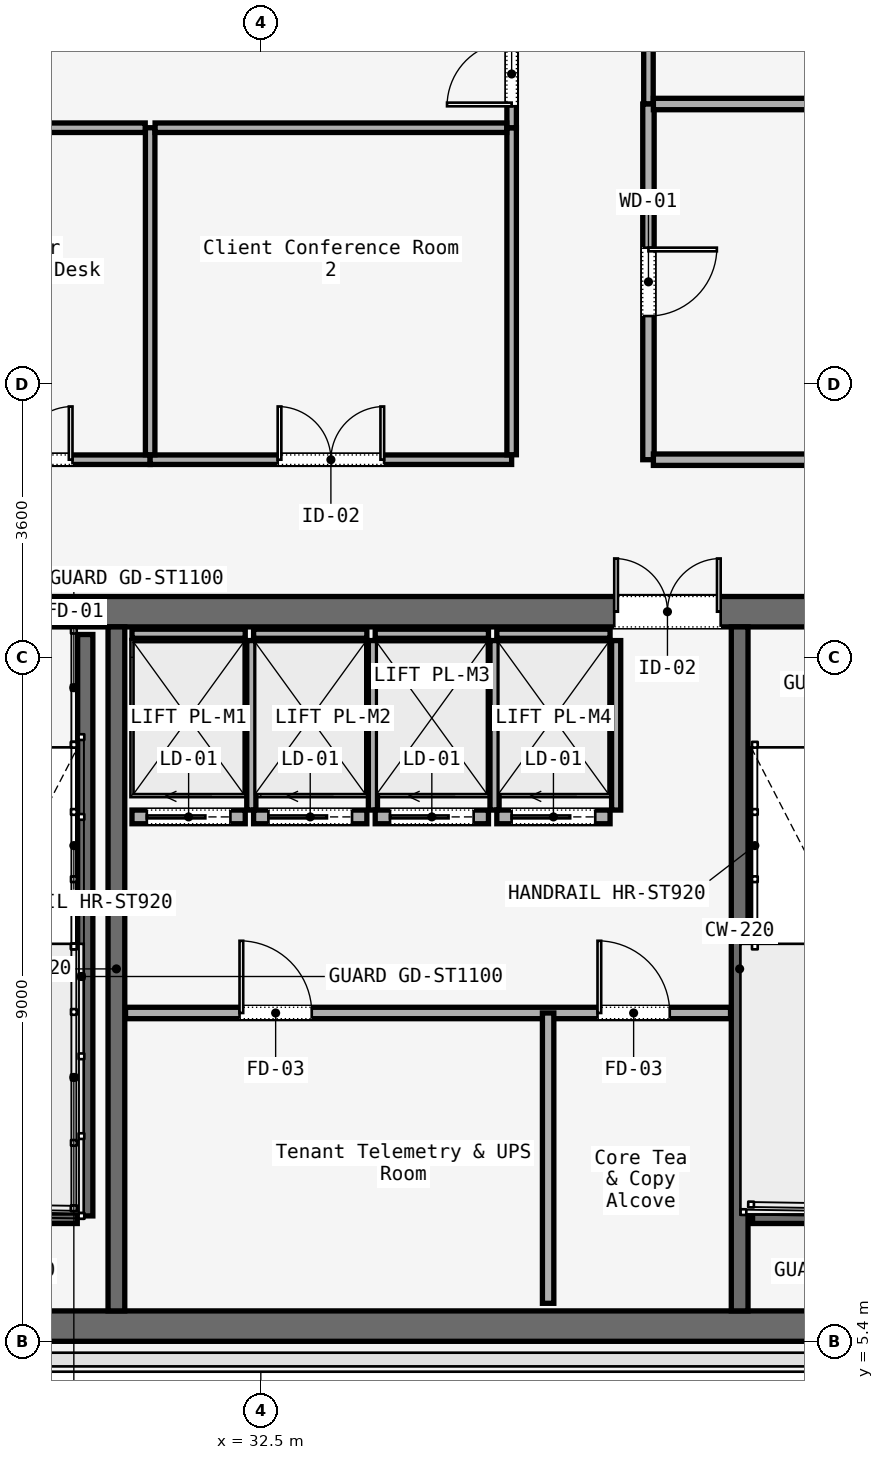
"""IFC4 building model, lengths in metres.
Left out: names, types, materials, properties, quantities, classifications, styles, units other than length and angle.
Written with IfcOpenShell. Run it as: python <this file> out.ifc"""

import sys

from ifc_helpers import new_model, si_unit, direction, frame, frame_2d, origin, place, context, subcontext, project, spatial, rectangle, extrude, element, fill, save


model = new_model("IFC4")
c1 = context("Model", 3, precision=1e-05, world=origin(), true_north=direction((0.0, 1.0)))
c2 = subcontext(c1, "Body", "Model", "MODEL_VIEW")
j1 = project(units=[si_unit("LENGTHUNIT", "METRE"), si_unit("PLANEANGLEUNIT", "RADIAN")], contexts=[c1])
p1 = place(None, origin())
s1 = spatial("IfcSite", under=j1, at=p1, CompositionType="ELEMENT")
p2 = place(p1, origin())
s2 = spatial("IfcBuilding", under=s1, at=p2, CompositionType="ELEMENT")
p3 = place(p2, frame((0.0, 0.0, 172.6)))
s3 = spatial("IfcBuildingStorey", under=s2, at=p3, CompositionType="ELEMENT", Elevation=172.6)
p4 = place(p3, frame((26.45, 15.0, 0.0), z_axis=(0.0, 0.0, 1.0), x_axis=(1.0, 0.0, 0.0)))
e1 = element("IfcWall", 1, at=p4, inside=s3, PredefinedType="SOLIDWALL", context=c2, shape_type="SweptSolid", body=[
    extrude(rectangle(XDim=31.1, YDim=0.4, at=frame_2d((15.55, 0.0))), origin(), (0.0, 0.0, 1.0), 3.58),
])
p5 = place(p4, frame((1.65, 0.0, 0.0)))
e2 = element("IfcOpeningElement", 2, at=p5, cuts=e1, PredefinedType="OPENING", context=c2, shape_type="SweptSolid", body=[
    extrude(rectangle(XDim=1.1, YDim=2.2, at=frame_2d((0.55, 1.1))), frame((0.0, 0.2, 0.0), z_axis=(0.0, -1.0, 0.0), x_axis=(1.0, 0.0, 0.0)), (0.0, 0.0, 1.0), 0.4),
])
p6 = place(p4, frame((13.65, 0.0, 0.0)))
e3 = element("IfcOpeningElement", 3, at=p6, cuts=e1, PredefinedType="OPENING", context=c2, shape_type="SweptSolid", body=[
    extrude(rectangle(XDim=1.1, YDim=2.2, at=frame_2d((0.55, 1.1))), frame((0.0, 0.2, 0.0), z_axis=(0.0, -1.0, 0.0), x_axis=(1.0, 0.0, 0.0)), (0.0, 0.0, 1.0), 0.4),
])
p7 = place(p4, frame((25.55, 0.0, 0.0)))
e4 = element("IfcOpeningElement", 4, at=p7, cuts=e1, PredefinedType="OPENING", context=c2, shape_type="SweptSolid", body=[
    extrude(rectangle(XDim=1.1, YDim=2.2, at=frame_2d((0.55, 1.1))), frame((0.0, 0.2, 0.0), z_axis=(0.0, -1.0, 0.0), x_axis=(1.0, 0.0, 0.0)), (0.0, 0.0, 1.0), 0.4),
])
p8 = place(p4, frame((10.7, 0.0, 0.0)))
e5 = element("IfcOpeningElement", 5, at=p8, cuts=e1, PredefinedType="OPENING", context=c2, shape_type="SweptSolid", body=[
    extrude(rectangle(XDim=1.4, YDim=2.2, at=frame_2d((0.7, 1.1))), frame((0.0, 0.2, 0.0), z_axis=(0.0, -1.0, 0.0), x_axis=(1.0, 0.0, 0.0)), (0.0, 0.0, 1.0), 0.4),
])
p9 = place(p4, frame((19.35, 0.0, 0.0)))
e6 = element("IfcOpeningElement", 6, at=p9, cuts=e1, PredefinedType="OPENING", context=c2, shape_type="SweptSolid", body=[
    extrude(rectangle(XDim=1.1, YDim=2.2, at=frame_2d((0.55, 1.1))), frame((0.0, 0.2, 0.0), z_axis=(0.0, -1.0, 0.0), x_axis=(1.0, 0.0, 0.0)), (0.0, 0.0, 1.0), 0.4),
])
p10 = place(p4, frame((21.4, 0.0, 0.0)))
e7 = element("IfcOpeningElement", 7, at=p10, cuts=e1, PredefinedType="OPENING", context=c2, shape_type="SweptSolid", body=[
    extrude(rectangle(XDim=0.9, YDim=2.1, at=frame_2d((0.45, 1.05))), frame((0.0, 0.2, 0.0), z_axis=(0.0, -1.0, 0.0), x_axis=(1.0, 0.0, 0.0)), (0.0, 0.0, 1.0), 0.4),
])
p11 = place(p4, frame((23.35, 0.0, 0.0)))
e8 = element("IfcOpeningElement", 8, at=p11, cuts=e1, PredefinedType="OPENING", context=c2, shape_type="SweptSolid", body=[
    extrude(rectangle(XDim=1.3, YDim=2.3, at=frame_2d((0.65, 1.15))), frame((0.0, 0.2, 0.0), z_axis=(0.0, -1.0, 0.0), x_axis=(1.0, 0.0, 0.0)), (0.0, 0.0, 1.0), 0.4),
])
p12 = place(p3, frame((26.45, 5.6, 0.0), z_axis=(0.0, 0.0, 1.0), x_axis=(1.0, 0.0, 0.0)))
e9 = element("IfcWall", 9, at=p12, inside=s3, PredefinedType="SOLIDWALL", context=c2, shape_type="SweptSolid", body=[
    extrude(rectangle(XDim=31.1, YDim=0.4, at=frame_2d((15.55, 0.0))), origin(), (0.0, 0.0, 1.0), 3.58),
])
for number, where, z_axis, x_axis in (
    (10, (30.6, 5.8, 0.0), (0.0, 0.0, 1.0), (0.0, 1.0, 0.0)),
    (11, (38.8, 5.8, 0.0), (0.0, 0.0, 1.0), (0.0, 1.0, 0.0)),
):
    element("IfcWall", number, at=place(p3, frame(where, z_axis=z_axis, x_axis=x_axis)), inside=s3, PredefinedType="SOLIDWALL", context=c2, shape_type="SweptSolid", body=[
        extrude(rectangle(XDim=9.0, YDim=0.22, at=frame_2d((4.5, 0.0))), origin(), (0.0, 0.0, 1.0), 3.58),
    ])
p13 = place(p3, frame((30.19, 14.7, 0.0), z_axis=(0.0, 0.0, 1.0), x_axis=(0.0, -1.0, 0.0)))
e12 = element("IfcWall", 12, at=p13, inside=s3, PredefinedType="SOLIDWALL", context=c2, shape_type="SweptSolid", body=[
    extrude(rectangle(XDim=7.65, YDim=0.2, at=frame_2d((3.825, 0.0))), origin(), (0.0, 0.0, 1.0), 3.8),
])
for number, where, z_axis, x_axis in (
    (13, (26.97, 7.05, 0.0), (0.0, 0.0, 1.0), (1.0, 0.0, 0.0)),
    (14, (38.97, 7.05, 0.0), (0.0, 0.0, 1.0), (1.0, 0.0, 0.0)),
):
    element("IfcWall", number, at=place(p3, frame(where, z_axis=z_axis, x_axis=x_axis)), inside=s3, PredefinedType="SOLIDWALL", context=c2, shape_type="SweptSolid", body=[
        extrude(rectangle(XDim=3.115, YDim=0.2, at=frame_2d((1.558, 0.0))), origin(), (0.0, 0.0, 1.0), 3.8),
    ])
p14 = place(p3, frame((30.72, 9.72, 0.0), z_axis=(0.0, 0.0, 1.0), x_axis=(1.0, 0.0, 0.0)))
e15 = element("IfcWall", 15, at=p14, inside=s3, PredefinedType="PARTITIONING", context=c2, shape_type="SweptSolid", body=[
    extrude(rectangle(XDim=7.96, YDim=0.15, at=frame_2d((3.98, 0.0))), origin(), (0.0, 0.0, 1.0), 3.01),
])
p15 = place(p14, frame((1.5, 0.0, 0.0)))
e16 = element("IfcOpeningElement", 16, at=p15, cuts=e15, PredefinedType="OPENING", context=c2, shape_type="SweptSolid", body=[
    extrude(rectangle(XDim=0.95, YDim=2.2, at=frame_2d((0.475, 1.1))), frame((0.0, 0.075, 0.0), z_axis=(0.0, -1.0, 0.0), x_axis=(1.0, 0.0, 0.0)), (0.0, 0.0, 1.0), 0.15),
])
p16 = place(p14, frame((6.21, 0.0, 0.0)))
e17 = element("IfcOpeningElement", 17, at=p16, cuts=e15, PredefinedType="OPENING", context=c2, shape_type="SweptSolid", body=[
    extrude(rectangle(XDim=0.95, YDim=2.2, at=frame_2d((0.475, 1.1))), frame((0.0, 0.075, 0.0), z_axis=(0.0, -1.0, 0.0), x_axis=(1.0, 0.0, 0.0)), (0.0, 0.0, 1.0), 0.15),
])
p17 = place(p3, frame((36.28, 5.9, 0.0), z_axis=(0.0, 0.0, 1.0), x_axis=(0.0, 1.0, 0.0)))
e18 = element("IfcWall", 18, at=p17, inside=s3, PredefinedType="PARTITIONING", context=c2, shape_type="SweptSolid", body=[
    extrude(rectangle(XDim=3.82, YDim=0.15, at=frame_2d((1.91, 0.0))), origin(), (0.0, 0.0, 1.0), 3.01),
])
p18 = place(p3, frame((30.805, 12.3, 0.0), z_axis=(0.0, 0.0, 1.0), x_axis=(1.0, 0.0, 0.0)))
e19 = element("IfcWall", 19, at=p18, inside=s3, PredefinedType="SOLIDWALL", context=c2, shape_type="SweptSolid", body=[
    extrude(rectangle(XDim=1.49, YDim=0.18, at=frame_2d((0.745, 0.0))), origin(), (0.0, 0.0, 1.0), 3.01),
])
p19 = place(p18, frame((0.195, 0.0, 0.0)))
e20 = element("IfcOpeningElement", 20, at=p19, cuts=e19, PredefinedType="OPENING", context=c2, shape_type="SweptSolid", body=[
    extrude(rectangle(XDim=1.1, YDim=2.2, at=frame_2d((0.55, 1.1))), frame((0.0, 0.09, 0.0), z_axis=(0.0, -1.0, 0.0), x_axis=(1.0, 0.0, 0.0)), (0.0, 0.0, 1.0), 0.18),
])
p20 = place(p3, frame((30.805, 14.71, 0.0), z_axis=(0.0, 0.0, 1.0), x_axis=(1.0, 0.0, 0.0)))
e21 = element("IfcWall", 21, at=p20, inside=s3, PredefinedType="SOLIDWALL", context=c2, shape_type="SweptSolid", body=[
    extrude(rectangle(XDim=1.49, YDim=0.12, at=frame_2d((0.745, 0.0))), origin(), (0.0, 0.0, 1.0), 3.01),
])
p21 = place(p3, frame((32.375, 12.39, 0.0), z_axis=(0.0, 0.0, 1.0), x_axis=(0.0, 1.0, 0.0)))
e22 = element("IfcWall", 22, at=p21, inside=s3, PredefinedType="SOLIDWALL", context=c2, shape_type="SweptSolid", body=[
    extrude(rectangle(XDim=2.23, YDim=0.12, at=frame_2d((1.115, 0.0))), origin(), (0.0, 0.0, 1.0), 3.01),
])
p22 = place(p3, frame((32.405, 12.3, 0.0), z_axis=(0.0, 0.0, 1.0), x_axis=(1.0, 0.0, 0.0)))
e23 = element("IfcWall", 23, at=p22, inside=s3, PredefinedType="SOLIDWALL", context=c2, shape_type="SweptSolid", body=[
    extrude(rectangle(XDim=1.49, YDim=0.18, at=frame_2d((0.745, 0.0))), origin(), (0.0, 0.0, 1.0), 3.01),
])
p23 = place(p22, frame((0.195, 0.0, 0.0)))
e24 = element("IfcOpeningElement", 24, at=p23, cuts=e23, PredefinedType="OPENING", context=c2, shape_type="SweptSolid", body=[
    extrude(rectangle(XDim=1.1, YDim=2.2, at=frame_2d((0.55, 1.1))), frame((0.0, 0.09, 0.0), z_axis=(0.0, -1.0, 0.0), x_axis=(1.0, 0.0, 0.0)), (0.0, 0.0, 1.0), 0.18),
])
p24 = place(p3, frame((32.405, 14.71, 0.0), z_axis=(0.0, 0.0, 1.0), x_axis=(1.0, 0.0, 0.0)))
e25 = element("IfcWall", 25, at=p24, inside=s3, PredefinedType="SOLIDWALL", context=c2, shape_type="SweptSolid", body=[
    extrude(rectangle(XDim=1.49, YDim=0.12, at=frame_2d((0.745, 0.0))), origin(), (0.0, 0.0, 1.0), 3.01),
])
p25 = place(p3, frame((33.975, 12.39, 0.0), z_axis=(0.0, 0.0, 1.0), x_axis=(0.0, 1.0, 0.0)))
e26 = element("IfcWall", 26, at=p25, inside=s3, PredefinedType="SOLIDWALL", context=c2, shape_type="SweptSolid", body=[
    extrude(rectangle(XDim=2.23, YDim=0.12, at=frame_2d((1.115, 0.0))), origin(), (0.0, 0.0, 1.0), 3.01),
])
p26 = place(p3, frame((34.005, 12.3, 0.0), z_axis=(0.0, 0.0, 1.0), x_axis=(1.0, 0.0, 0.0)))
e27 = element("IfcWall", 27, at=p26, inside=s3, PredefinedType="SOLIDWALL", context=c2, shape_type="SweptSolid", body=[
    extrude(rectangle(XDim=1.49, YDim=0.18, at=frame_2d((0.745, 0.0))), origin(), (0.0, 0.0, 1.0), 3.01),
])
p27 = place(p26, frame((0.195, 0.0, 0.0)))
e28 = element("IfcOpeningElement", 28, at=p27, cuts=e27, PredefinedType="OPENING", context=c2, shape_type="SweptSolid", body=[
    extrude(rectangle(XDim=1.1, YDim=2.2, at=frame_2d((0.55, 1.1))), frame((0.0, 0.09, 0.0), z_axis=(0.0, -1.0, 0.0), x_axis=(1.0, 0.0, 0.0)), (0.0, 0.0, 1.0), 0.18),
])
p28 = place(p3, frame((34.005, 14.71, 0.0), z_axis=(0.0, 0.0, 1.0), x_axis=(1.0, 0.0, 0.0)))
e29 = element("IfcWall", 29, at=p28, inside=s3, PredefinedType="SOLIDWALL", context=c2, shape_type="SweptSolid", body=[
    extrude(rectangle(XDim=1.49, YDim=0.12, at=frame_2d((0.745, 0.0))), origin(), (0.0, 0.0, 1.0), 3.01),
])
p29 = place(p3, frame((35.575, 12.39, 0.0), z_axis=(0.0, 0.0, 1.0), x_axis=(0.0, 1.0, 0.0)))
e30 = element("IfcWall", 30, at=p29, inside=s3, PredefinedType="SOLIDWALL", context=c2, shape_type="SweptSolid", body=[
    extrude(rectangle(XDim=2.23, YDim=0.12, at=frame_2d((1.115, 0.0))), origin(), (0.0, 0.0, 1.0), 3.01),
])
p30 = place(p3, frame((35.605, 12.3, 0.0), z_axis=(0.0, 0.0, 1.0), x_axis=(1.0, 0.0, 0.0)))
e31 = element("IfcWall", 31, at=p30, inside=s3, PredefinedType="SOLIDWALL", context=c2, shape_type="SweptSolid", body=[
    extrude(rectangle(XDim=1.49, YDim=0.18, at=frame_2d((0.745, 0.0))), origin(), (0.0, 0.0, 1.0), 3.01),
])
p31 = place(p30, frame((0.195, 0.0, 0.0)))
e32 = element("IfcOpeningElement", 32, at=p31, cuts=e31, PredefinedType="OPENING", context=c2, shape_type="SweptSolid", body=[
    extrude(rectangle(XDim=1.1, YDim=2.2, at=frame_2d((0.55, 1.1))), frame((0.0, 0.09, 0.0), z_axis=(0.0, -1.0, 0.0), x_axis=(1.0, 0.0, 0.0)), (0.0, 0.0, 1.0), 0.18),
])
p32 = place(p3, frame((35.605, 14.71, 0.0), z_axis=(0.0, 0.0, 1.0), x_axis=(1.0, 0.0, 0.0)))
e33 = element("IfcWall", 33, at=p32, inside=s3, PredefinedType="SOLIDWALL", context=c2, shape_type="SweptSolid", body=[
    extrude(rectangle(XDim=1.49, YDim=0.12, at=frame_2d((0.745, 0.0))), origin(), (0.0, 0.0, 1.0), 3.01),
])
p33 = place(p3, frame((37.175, 12.39, 0.0), z_axis=(0.0, 0.0, 1.0), x_axis=(0.0, 1.0, 0.0)))
e34 = element("IfcWall", 34, at=p33, inside=s3, PredefinedType="SOLIDWALL", context=c2, shape_type="SweptSolid", body=[
    extrude(rectangle(XDim=2.23, YDim=0.12, at=frame_2d((1.115, 0.0))), origin(), (0.0, 0.0, 1.0), 3.01),
])
p34 = place(p3, frame((27.6, 17.0, 0.0), z_axis=(0.0, 0.0, 1.0), x_axis=(1.0, 0.0, 0.0)))
e35 = element("IfcWall", 35, at=p34, inside=s3, PredefinedType="PARTITIONING", context=c2, shape_type="SweptSolid", body=[
    extrude(rectangle(XDim=3.444, YDim=0.125, at=frame_2d((1.722, 0.0))), origin(), (0.0, 0.0, 1.0), 3.01),
])
p35 = place(p34, frame((1.022, 0.0, 0.0)))
e36 = element("IfcOpeningElement", 36, at=p35, cuts=e35, PredefinedType="OPENING", context=c2, shape_type="SweptSolid", body=[
    extrude(rectangle(XDim=1.4, YDim=2.2, at=frame_2d((0.7, 1.1))), frame((0.0, 0.062, 0.0), z_axis=(0.0, -1.0, 0.0), x_axis=(1.0, 0.0, 0.0)), (0.0, 0.0, 1.0), 0.125),
])
p36 = place(p3, frame((31.044, 17.0, 0.0), z_axis=(0.0, 0.0, 1.0), x_axis=(1.0, 0.0, 0.0)))
e37 = element("IfcWall", 37, at=p36, inside=s3, PredefinedType="PARTITIONING", context=c2, shape_type="SweptSolid", body=[
    extrude(rectangle(XDim=4.756, YDim=0.125, at=frame_2d((2.378, 0.0))), origin(), (0.0, 0.0, 1.0), 3.01),
])
p37 = place(p36, frame((1.678, 0.0, 0.0)))
e38 = element("IfcOpeningElement", 38, at=p37, cuts=e37, PredefinedType="OPENING", context=c2, shape_type="SweptSolid", body=[
    extrude(rectangle(XDim=1.4, YDim=2.2, at=frame_2d((0.7, 1.1))), frame((0.0, 0.062, 0.0), z_axis=(0.0, -1.0, 0.0), x_axis=(1.0, 0.0, 0.0)), (0.0, 0.0, 1.0), 0.125),
])
p38 = place(p3, frame((35.8, 17.065, 0.0), z_axis=(0.0, 0.0, 1.0), x_axis=(0.0, 1.0, 0.0)))
e39 = element("IfcWall", 39, at=p38, inside=s3, PredefinedType="PARTITIONING", context=c2, shape_type="SweptSolid", body=[
    extrude(rectangle(XDim=4.303, YDim=0.125, at=frame_2d((2.151, 0.0))), origin(), (0.0, 0.0, 1.0), 3.01),
])
p39 = place(p3, frame((35.8, 21.368, 0.0), z_axis=(0.0, 0.0, 1.0), x_axis=(0.0, 1.0, 0.0)))
e40 = element("IfcWall", 40, at=p39, inside=s3, PredefinedType="PARTITIONING", context=c2, shape_type="SweptSolid", body=[
    extrude(rectangle(XDim=2.715, YDim=0.125, at=frame_2d((1.357, 0.0))), origin(), (0.0, 0.0, 1.0), 3.01),
])
p40 = place(p39, frame((0.282, 0.0, 0.0)))
e41 = element("IfcOpeningElement", 41, at=p40, cuts=e40, PredefinedType="OPENING", context=c2, shape_type="SweptSolid", body=[
    extrude(rectangle(XDim=0.85, YDim=2.15, at=frame_2d((0.425, 1.075))), frame((0.0, 0.062, 0.0), z_axis=(0.0, -1.0, 0.0), x_axis=(1.0, 0.0, 0.0)), (0.0, 0.0, 1.0), 0.125),
])
p41 = place(p3, frame((37.6, 27.4, 0.0), z_axis=(0.0, 0.0, 1.0), x_axis=(0.0, -1.0, 0.0)))
e42 = element("IfcWall", 42, at=p41, inside=s3, PredefinedType="PARTITIONING", context=c2, shape_type="SweptSolid", body=[
    extrude(rectangle(XDim=5.72, YDim=0.125, at=frame_2d((2.86, 0.0))), origin(), (0.0, 0.0, 1.0), 3.01),
])
p42 = place(p41, frame((2.385, 0.0, 0.0)))
e43 = element("IfcOpeningElement", 43, at=p42, cuts=e42, PredefinedType="OPENING", context=c2, shape_type="SweptSolid", body=[
    extrude(rectangle(XDim=0.95, YDim=2.2, at=frame_2d((0.475, 1.1))), frame((0.0, 0.062, 0.0), z_axis=(0.0, -1.0, 0.0), x_axis=(1.0, 0.0, 0.0)), (0.0, 0.0, 1.0), 0.125),
])
p43 = place(p3, frame((37.6, 21.68, 0.0), z_axis=(0.0, 0.0, 1.0), x_axis=(0.0, -1.0, 0.0)))
e44 = element("IfcWall", 44, at=p43, inside=s3, PredefinedType="PARTITIONING", context=c2, shape_type="SweptSolid", body=[
    extrude(rectangle(XDim=4.68, YDim=0.15, at=frame_2d((2.34, 0.0))), origin(), (0.0, 0.0, 1.0), 3.01),
])
p44 = place(p43, frame((1.89, 0.0, 0.0)))
e45 = element("IfcOpeningElement", 45, at=p44, cuts=e44, PredefinedType="OPENING", context=c2, shape_type="SweptSolid", body=[
    extrude(rectangle(XDim=0.9, YDim=2.15, at=frame_2d((0.45, 1.075))), frame((0.0, 0.075, 0.0), z_axis=(0.0, -1.0, 0.0), x_axis=(1.0, 0.0, 0.0)), (0.0, 0.0, 1.0), 0.15),
])
p45 = place(p3, frame((37.665, 17.0, 0.0), z_axis=(0.0, 0.0, 1.0), x_axis=(1.0, 0.0, 0.0)))
e46 = element("IfcWall", 46, at=p45, inside=s3, PredefinedType="PARTITIONING", context=c2, shape_type="SweptSolid", body=[
    extrude(rectangle(XDim=3.985, YDim=0.15, at=frame_2d((1.992, 0.0))), origin(), (0.0, 0.0, 1.0), 3.01),
])
p46 = place(p3, frame((31.044, 21.368, 0.0), z_axis=(0.0, 0.0, 1.0), x_axis=(0.0, -1.0, 0.0)))
e47 = element("IfcWall", 47, at=p46, inside=s3, PredefinedType="PARTITIONING", context=c2, shape_type="SweptSolid", body=[
    extrude(rectangle(XDim=4.303, YDim=0.125, at=frame_2d((2.151, 0.0))), origin(), (0.0, 0.0, 1.0), 3.01),
])
p47 = place(p3, frame((27.665, 21.368, 0.0), z_axis=(0.0, 0.0, 1.0), x_axis=(1.0, 0.0, 0.0)))
e48 = element("IfcWall", 48, at=p47, inside=s3, PredefinedType="PARTITIONING", context=c2, shape_type="SweptSolid", body=[
    extrude(rectangle(XDim=3.314, YDim=0.125, at=frame_2d((1.657, 0.0))), origin(), (0.0, 0.0, 1.0), 3.01),
])
p48 = place(p3, frame((31.109, 21.368, 0.0), z_axis=(0.0, 0.0, 1.0), x_axis=(1.0, 0.0, 0.0)))
e49 = element("IfcWall", 49, at=p48, inside=s3, PredefinedType="PARTITIONING", context=c2, shape_type="SweptSolid", body=[
    extrude(rectangle(XDim=4.626, YDim=0.125, at=frame_2d((2.313, 0.0))), origin(), (0.0, 0.0, 1.0), 3.01),
])
p49 = place(p3, frame((37.665, 21.68, 0.0), z_axis=(0.0, 0.0, 1.0), x_axis=(1.0, 0.0, 0.0)))
e50 = element("IfcWall", 50, at=p49, inside=s3, PredefinedType="PARTITIONING", context=c2, shape_type="SweptSolid", body=[
    extrude(rectangle(XDim=3.715, YDim=0.15, at=frame_2d((1.857, 0.0))), origin(), (0.0, 0.0, 1.0), 3.01),
])
p50 = place(p8, origin())
e51 = element("IfcDoor", 51, at=p50, inside=s3, OperationType="DOUBLE_DOOR_SINGLE_SWING", PredefinedType="DOOR", context=c2, shape_type="SweptSolid", body=[
    extrude(rectangle(XDim=1.4, YDim=2.2, at=frame_2d((0.7, 1.1))), frame((0.0, 0.025, 0.0), z_axis=(0.0, -1.0, 0.0), x_axis=(1.0, 0.0, 0.0)), (0.0, 0.0, 1.0), 0.05),
])
fill(e5, e51)
p51 = place(p15, origin())
e52 = element("IfcDoor", 52, at=p51, inside=s3, OperationType="SINGLE_SWING_LEFT", PredefinedType="DOOR", context=c2, shape_type="SweptSolid", body=[
    extrude(rectangle(XDim=0.95, YDim=2.2, at=frame_2d((0.475, 1.1))), frame((0.0, 0.025, 0.0), z_axis=(0.0, -1.0, 0.0), x_axis=(1.0, 0.0, 0.0)), (0.0, 0.0, 1.0), 0.05),
])
fill(e16, e52)
p52 = place(p16, origin())
e53 = element("IfcDoor", 53, at=p52, inside=s3, OperationType="SINGLE_SWING_RIGHT", PredefinedType="DOOR", context=c2, shape_type="SweptSolid", body=[
    extrude(rectangle(XDim=0.95, YDim=2.2, at=frame_2d((0.475, 1.1))), frame((0.0, 0.025, 0.0), z_axis=(0.0, -1.0, 0.0), x_axis=(1.0, 0.0, 0.0)), (0.0, 0.0, 1.0), 0.05),
])
fill(e17, e53)
p53 = place(p19, origin())
e54 = element("IfcDoor", 54, at=p53, inside=s3, OperationType="SLIDING_TO_LEFT", PredefinedType="DOOR", context=c2, shape_type="SweptSolid", body=[
    extrude(rectangle(XDim=1.1, YDim=2.2, at=frame_2d((0.55, 1.1))), frame((0.0, 0.025, 0.0), z_axis=(0.0, -1.0, 0.0), x_axis=(1.0, 0.0, 0.0)), (0.0, 0.0, 1.0), 0.05),
])
fill(e20, e54)
p54 = place(p23, origin())
e55 = element("IfcDoor", 55, at=p54, inside=s3, OperationType="SLIDING_TO_LEFT", PredefinedType="DOOR", context=c2, shape_type="SweptSolid", body=[
    extrude(rectangle(XDim=1.1, YDim=2.2, at=frame_2d((0.55, 1.1))), frame((0.0, 0.025, 0.0), z_axis=(0.0, -1.0, 0.0), x_axis=(1.0, 0.0, 0.0)), (0.0, 0.0, 1.0), 0.05),
])
fill(e24, e55)
p55 = place(p27, origin())
e56 = element("IfcDoor", 56, at=p55, inside=s3, OperationType="SLIDING_TO_LEFT", PredefinedType="DOOR", context=c2, shape_type="SweptSolid", body=[
    extrude(rectangle(XDim=1.1, YDim=2.2, at=frame_2d((0.55, 1.1))), frame((0.0, 0.025, 0.0), z_axis=(0.0, -1.0, 0.0), x_axis=(1.0, 0.0, 0.0)), (0.0, 0.0, 1.0), 0.05),
])
fill(e28, e56)
p56 = place(p31, origin())
e57 = element("IfcDoor", 57, at=p56, inside=s3, OperationType="SLIDING_TO_LEFT", PredefinedType="DOOR", context=c2, shape_type="SweptSolid", body=[
    extrude(rectangle(XDim=1.1, YDim=2.2, at=frame_2d((0.55, 1.1))), frame((0.0, 0.025, 0.0), z_axis=(0.0, -1.0, 0.0), x_axis=(1.0, 0.0, 0.0)), (0.0, 0.0, 1.0), 0.05),
])
fill(e32, e57)
p57 = place(p35, origin())
e58 = element("IfcDoor", 58, at=p57, inside=s3, OperationType="SINGLE_SWING_LEFT", PredefinedType="DOOR", context=c2, shape_type="SweptSolid", body=[
    extrude(rectangle(XDim=1.4, YDim=2.2, at=frame_2d((0.7, 1.1))), frame((0.0, 0.025, 0.0), z_axis=(0.0, -1.0, 0.0), x_axis=(1.0, 0.0, 0.0)), (0.0, 0.0, 1.0), 0.05),
])
fill(e36, e58)
p58 = place(p37, origin())
e59 = element("IfcDoor", 59, at=p58, inside=s3, OperationType="SINGLE_SWING_RIGHT", PredefinedType="DOOR", context=c2, shape_type="SweptSolid", body=[
    extrude(rectangle(XDim=1.4, YDim=2.2, at=frame_2d((0.7, 1.1))), frame((0.0, 0.025, 0.0), z_axis=(0.0, -1.0, 0.0), x_axis=(1.0, 0.0, 0.0)), (0.0, 0.0, 1.0), 0.05),
])
fill(e38, e59)
p59 = place(p44, origin())
e60 = element("IfcDoor", 60, at=p59, inside=s3, OperationType="SINGLE_SWING_LEFT", PredefinedType="DOOR", context=c2, shape_type="SweptSolid", body=[
    extrude(rectangle(XDim=0.9, YDim=2.15, at=frame_2d((0.45, 1.075))), frame((0.0, 0.025, 0.0), z_axis=(0.0, -1.0, 0.0), x_axis=(1.0, 0.0, 0.0)), (0.0, 0.0, 1.0), 0.05),
])
fill(e45, e60)
p60 = place(p40, origin())
e61 = element("IfcDoor", 61, at=p60, inside=s3, OperationType="SINGLE_SWING_LEFT", PredefinedType="DOOR", context=c2, shape_type="SweptSolid", body=[
    extrude(rectangle(XDim=0.85, YDim=2.15, at=frame_2d((0.425, 1.075))), frame((0.0, 0.025, 0.0), z_axis=(0.0, -1.0, 0.0), x_axis=(1.0, 0.0, 0.0)), (0.0, 0.0, 1.0), 0.05),
])
fill(e41, e61)
save(model, sys.argv[1])
